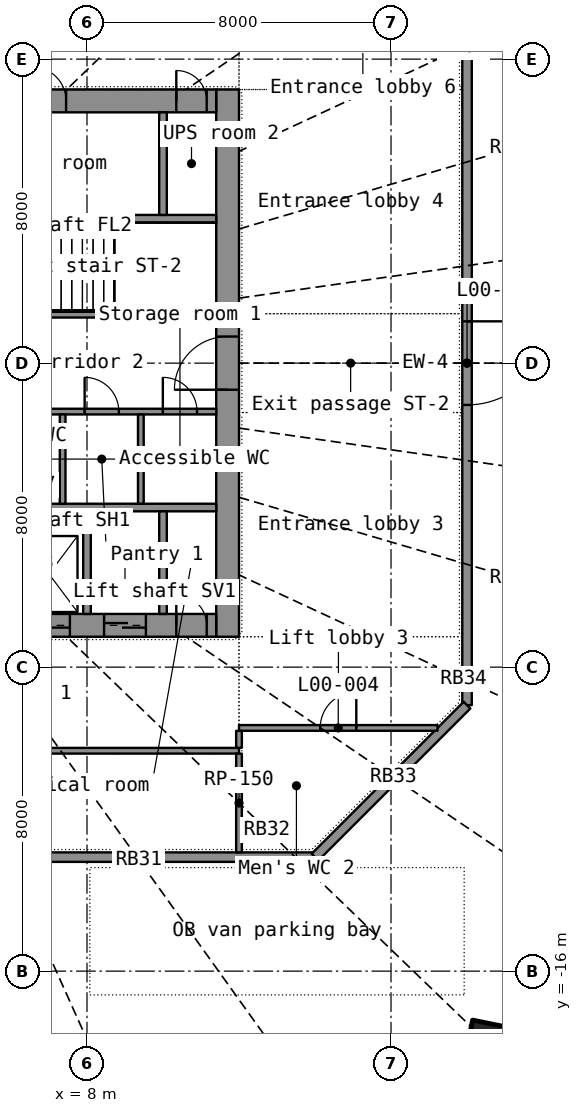
"""IFC4 building model, lengths in metres.
Left out: names, types, materials, properties, quantities, classifications, styles, units other than length and angle.
Written with IfcOpenShell. Run it as: python <this file> out.ifc"""

import sys

from ifc_helpers import new_model, si_unit, direction, frame, frame_2d, origin, origin_2d, place, context, subcontext, project, spatial, rectangle, hollow_rectangle, extrude, element, fill, save


model = new_model("IFC4")
c1 = context("Model", 3, precision=1e-05, world=origin(), true_north=direction((0.0, 1.0)))
c2 = subcontext(c1, "Body", "Model", "MODEL_VIEW")
j1 = project(units=[si_unit("LENGTHUNIT", "METRE"), si_unit("PLANEANGLEUNIT", "RADIAN")], contexts=[c1])
p1 = place(None, origin())
s1 = spatial("IfcSite", under=j1, at=p1, CompositionType="ELEMENT")
p2 = place(p1, origin())
s2 = spatial("IfcBuilding", under=s1, at=p2, CompositionType="ELEMENT")
p3 = place(p2, origin())
s3 = spatial("IfcBuildingStorey", under=s2, at=p3, CompositionType="ELEMENT", Elevation=0.0)
p4 = place(p3, frame((18.536, -17.878, 0.0), z_axis=(-0.022240937, 0.021683171, 0.999517474), x_axis=(-0.827084796, -0.562042845, -0.006211267)))
e1 = element("IfcColumn", 1, at=p4, inside=s3, PredefinedType="COLUMN", context=c2, shape_type="SweptSolid", body=[
    extrude(hollow_rectangle(XDim=1.0, YDim=1.0, WallThickness=0.032, at=origin_2d()), origin(), (0.0, 0.0, 1.0), 7.003),
])
p5 = place(p3, frame((18.0, 9.0, 0.0), z_axis=(0.0, 0.0, 1.0), x_axis=(0.0, -1.0, 0.0)))
e2 = element("IfcWall", 2, at=p5, inside=s3, PredefinedType="STANDARD", context=c2, shape_type="SweptSolid", body=[
    extrude(rectangle(XDim=18.0, YDim=0.25, at=frame_2d((9.0, 0.0))), origin(), (0.0, 0.0, 1.0), 6.6),
])
p6 = place(p5, frame((7.9, 0.0, 0.0)))
e3 = element("IfcOpeningElement", 3, at=p6, cuts=e2, PredefinedType="OPENING", context=c2, shape_type="SweptSolid", body=[
    extrude(rectangle(XDim=2.2, YDim=2.4, at=frame_2d((1.1, 1.2))), frame((0.0, 0.135, 0.0), z_axis=(0.0, -1.0, 0.0), x_axis=(1.0, 0.0, 0.0)), (0.0, 0.0, 1.0), 0.27),
])
p7 = place(p3, frame((14.0, -13.0, 0.0), z_axis=(0.0, 0.0, 1.0), x_axis=(-1.0, 0.0, 0.0)))
e4 = element("IfcWall", 4, at=p7, inside=s3, PredefinedType="STANDARD", context=c2, shape_type="SweptSolid", body=[
    extrude(rectangle(XDim=28.0, YDim=0.25, at=frame_2d((14.0, 0.0))), origin(), (0.0, 0.0, 1.0), 6.6),
])
p8 = place(p7, frame((15.8, 0.0, 0.0)))
e5 = element("IfcOpeningElement", 5, at=p8, cuts=e4, PredefinedType="OPENING", context=c2, shape_type="SweptSolid", body=[
    extrude(rectangle(XDim=2.4, YDim=3.0, at=frame_2d((1.2, 1.5))), frame((0.0, 0.135, 0.0), z_axis=(0.0, -1.0, 0.0), x_axis=(1.0, 0.0, 0.0)), (0.0, 0.0, 1.0), 0.27),
])
p9 = place(p7, frame((9.8, 0.0, 0.0)))
e6 = element("IfcOpeningElement", 6, at=p9, cuts=e4, PredefinedType="OPENING", context=c2, shape_type="SweptSolid", body=[
    extrude(rectangle(XDim=2.4, YDim=3.0, at=frame_2d((1.2, 1.5))), frame((0.0, 0.135, 0.0), z_axis=(0.0, -1.0, 0.0), x_axis=(1.0, 0.0, 0.0)), (0.0, 0.0, 1.0), 0.27),
])
p10 = place(p3, frame((18.0, -9.0, 0.0), z_axis=(0.0, 0.0, 1.0), x_axis=(-0.707106781, -0.707106781, 0.0)))
e7 = element("IfcWall", 7, at=p10, inside=s3, PredefinedType="STANDARD", context=c2, shape_type="SweptSolid", body=[
    extrude(rectangle(XDim=5.657, YDim=0.25, at=frame_2d((2.828, 0.0))), origin(), (0.0, 0.0, 1.0), 6.6),
])
p11 = place(p3, frame((11.7, -7.2, 0.0), z_axis=(0.0, 0.0, 1.0), x_axis=(0.0, 1.0, 0.0)))
e8 = element("IfcWall", 8, at=p11, inside=s3, PredefinedType="SHEAR", context=c2, shape_type="SweptSolid", body=[
    extrude(rectangle(XDim=14.4, YDim=0.6, at=frame_2d((7.2, 0.0))), origin(), (0.0, 0.0, 1.0), 6.6),
])
p12 = place(p11, frame((6.5, 0.0, 0.0)))
e9 = element("IfcOpeningElement", 9, at=p12, cuts=e8, PredefinedType="OPENING", context=c2, shape_type="SweptSolid", body=[
    extrude(rectangle(XDim=1.4, YDim=2.2, at=frame_2d((0.7, 1.1))), frame((0.0, 0.31, 0.0), z_axis=(0.0, -1.0, 0.0), x_axis=(1.0, 0.0, 0.0)), (0.0, 0.0, 1.0), 0.62),
])
p13 = place(p3, frame((-11.4, -6.9, 0.0), z_axis=(0.0, 0.0, 1.0), x_axis=(1.0, 0.0, 0.0)))
e10 = element("IfcWall", 10, at=p13, inside=s3, PredefinedType="SHEAR", context=c2, shape_type="SweptSolid", body=[
    extrude(rectangle(XDim=22.8, YDim=0.6, at=frame_2d((11.4, 0.0))), origin(), (0.0, 0.0, 1.0), 6.6),
])
p14 = place(p13, frame((1.85, 0.0, 0.0)))
e11 = element("IfcOpeningElement", 11, at=p14, cuts=e10, PredefinedType="OPENING", context=c2, shape_type="SweptSolid", body=[
    extrude(rectangle(XDim=1.1, YDim=2.2, at=frame_2d((0.55, 1.1))), frame((0.0, 0.31, 0.0), z_axis=(0.0, -1.0, 0.0), x_axis=(1.0, 0.0, 0.0)), (0.0, 0.0, 1.0), 0.62),
])
p15 = place(p13, frame((3.85, 0.0, 0.0)))
e12 = element("IfcOpeningElement", 12, at=p15, cuts=e10, PredefinedType="OPENING", context=c2, shape_type="SweptSolid", body=[
    extrude(rectangle(XDim=1.1, YDim=2.2, at=frame_2d((0.55, 1.1))), frame((0.0, 0.31, 0.0), z_axis=(0.0, -1.0, 0.0), x_axis=(1.0, 0.0, 0.0)), (0.0, 0.0, 1.0), 0.62),
])
p16 = place(p13, frame((5.85, 0.0, 0.0)))
e13 = element("IfcOpeningElement", 13, at=p16, cuts=e10, PredefinedType="OPENING", context=c2, shape_type="SweptSolid", body=[
    extrude(rectangle(XDim=1.1, YDim=2.2, at=frame_2d((0.55, 1.1))), frame((0.0, 0.31, 0.0), z_axis=(0.0, -1.0, 0.0), x_axis=(1.0, 0.0, 0.0)), (0.0, 0.0, 1.0), 0.62),
])
p17 = place(p13, frame((7.85, 0.0, 0.0)))
e14 = element("IfcOpeningElement", 14, at=p17, cuts=e10, PredefinedType="OPENING", context=c2, shape_type="SweptSolid", body=[
    extrude(rectangle(XDim=1.1, YDim=2.2, at=frame_2d((0.55, 1.1))), frame((0.0, 0.31, 0.0), z_axis=(0.0, -1.0, 0.0), x_axis=(1.0, 0.0, 0.0)), (0.0, 0.0, 1.0), 0.62),
])
p18 = place(p13, frame((9.85, 0.0, 0.0)))
e15 = element("IfcOpeningElement", 15, at=p18, cuts=e10, PredefinedType="OPENING", context=c2, shape_type="SweptSolid", body=[
    extrude(rectangle(XDim=1.1, YDim=2.2, at=frame_2d((0.55, 1.1))), frame((0.0, 0.31, 0.0), z_axis=(0.0, -1.0, 0.0), x_axis=(1.0, 0.0, 0.0)), (0.0, 0.0, 1.0), 0.62),
])
p19 = place(p13, frame((11.85, 0.0, 0.0)))
e16 = element("IfcOpeningElement", 16, at=p19, cuts=e10, PredefinedType="OPENING", context=c2, shape_type="SweptSolid", body=[
    extrude(rectangle(XDim=1.1, YDim=2.2, at=frame_2d((0.55, 1.1))), frame((0.0, 0.31, 0.0), z_axis=(0.0, -1.0, 0.0), x_axis=(1.0, 0.0, 0.0)), (0.0, 0.0, 1.0), 0.62),
])
p20 = place(p13, frame((13.85, 0.0, 0.0)))
e17 = element("IfcOpeningElement", 17, at=p20, cuts=e10, PredefinedType="OPENING", context=c2, shape_type="SweptSolid", body=[
    extrude(rectangle(XDim=1.1, YDim=2.2, at=frame_2d((0.55, 1.1))), frame((0.0, 0.31, 0.0), z_axis=(0.0, -1.0, 0.0), x_axis=(1.0, 0.0, 0.0)), (0.0, 0.0, 1.0), 0.62),
])
p21 = place(p13, frame((15.85, 0.0, 0.0)))
e18 = element("IfcOpeningElement", 18, at=p21, cuts=e10, PredefinedType="OPENING", context=c2, shape_type="SweptSolid", body=[
    extrude(rectangle(XDim=1.1, YDim=2.2, at=frame_2d((0.55, 1.1))), frame((0.0, 0.31, 0.0), z_axis=(0.0, -1.0, 0.0), x_axis=(1.0, 0.0, 0.0)), (0.0, 0.0, 1.0), 0.62),
])
p22 = place(p13, frame((17.85, 0.0, 0.0)))
e19 = element("IfcOpeningElement", 19, at=p22, cuts=e10, PredefinedType="OPENING", context=c2, shape_type="SweptSolid", body=[
    extrude(rectangle(XDim=1.1, YDim=2.2, at=frame_2d((0.55, 1.1))), frame((0.0, 0.31, 0.0), z_axis=(0.0, -1.0, 0.0), x_axis=(1.0, 0.0, 0.0)), (0.0, 0.0, 1.0), 0.62),
])
p23 = place(p13, frame((19.85, 0.0, 0.0)))
e20 = element("IfcOpeningElement", 20, at=p23, cuts=e10, PredefinedType="OPENING", context=c2, shape_type="SweptSolid", body=[
    extrude(rectangle(XDim=1.1, YDim=2.2, at=frame_2d((0.55, 1.1))), frame((0.0, 0.31, 0.0), z_axis=(0.0, -1.0, 0.0), x_axis=(1.0, 0.0, 0.0)), (0.0, 0.0, 1.0), 0.62),
])
p24 = place(p13, frame((0.25, 0.0, 0.0)))
e21 = element("IfcOpeningElement", 21, at=p24, cuts=e10, PredefinedType="OPENING", context=c2, shape_type="SweptSolid", body=[
    extrude(rectangle(XDim=0.8, YDim=2.05, at=frame_2d((0.4, 1.025))), frame((0.0, 0.31, 0.0), z_axis=(0.0, -1.0, 0.0), x_axis=(1.0, 0.0, 0.0)), (0.0, 0.0, 1.0), 0.62),
])
p25 = place(p13, frame((21.75, 0.0, 0.0)))
e22 = element("IfcOpeningElement", 22, at=p25, cuts=e10, PredefinedType="OPENING", context=c2, shape_type="SweptSolid", body=[
    extrude(rectangle(XDim=0.8, YDim=2.05, at=frame_2d((0.4, 1.025))), frame((0.0, 0.31, 0.0), z_axis=(0.0, -1.0, 0.0), x_axis=(1.0, 0.0, 0.0)), (0.0, 0.0, 1.0), 0.62),
])
p26 = place(p3, frame((-11.4, 6.9, 0.0), z_axis=(0.0, 0.0, 1.0), x_axis=(1.0, 0.0, 0.0)))
e23 = element("IfcWall", 23, at=p26, inside=s3, PredefinedType="SHEAR", context=c2, shape_type="SweptSolid", body=[
    extrude(rectangle(XDim=22.8, YDim=0.6, at=frame_2d((11.4, 0.0))), origin(), (0.0, 0.0, 1.0), 6.6),
])
p27 = place(p26, frame((1.85, 0.0, 0.0)))
e24 = element("IfcOpeningElement", 24, at=p27, cuts=e23, PredefinedType="OPENING", context=c2, shape_type="SweptSolid", body=[
    extrude(rectangle(XDim=1.1, YDim=2.2, at=frame_2d((0.55, 1.1))), frame((0.0, 0.31, 0.0), z_axis=(0.0, -1.0, 0.0), x_axis=(1.0, 0.0, 0.0)), (0.0, 0.0, 1.0), 0.62),
])
p28 = place(p26, frame((3.85, 0.0, 0.0)))
e25 = element("IfcOpeningElement", 25, at=p28, cuts=e23, PredefinedType="OPENING", context=c2, shape_type="SweptSolid", body=[
    extrude(rectangle(XDim=1.1, YDim=2.2, at=frame_2d((0.55, 1.1))), frame((0.0, 0.31, 0.0), z_axis=(0.0, -1.0, 0.0), x_axis=(1.0, 0.0, 0.0)), (0.0, 0.0, 1.0), 0.62),
])
p29 = place(p26, frame((6.95, 0.0, 0.0)))
e26 = element("IfcOpeningElement", 26, at=p29, cuts=e23, PredefinedType="OPENING", context=c2, shape_type="SweptSolid", body=[
    extrude(rectangle(XDim=0.9, YDim=2.1, at=frame_2d((0.45, 1.05))), frame((0.0, 0.31, 0.0), z_axis=(0.0, -1.0, 0.0), x_axis=(1.0, 0.0, 0.0)), (0.0, 0.0, 1.0), 0.62),
])
p30 = place(p26, frame((11.95, 0.0, 0.0)))
e27 = element("IfcOpeningElement", 27, at=p30, cuts=e23, PredefinedType="OPENING", context=c2, shape_type="SweptSolid", body=[
    extrude(rectangle(XDim=0.9, YDim=2.1, at=frame_2d((0.45, 1.05))), frame((0.0, 0.31, 0.0), z_axis=(0.0, -1.0, 0.0), x_axis=(1.0, 0.0, 0.0)), (0.0, 0.0, 1.0), 0.62),
])
p31 = place(p26, frame((17.95, 0.0, 0.0)))
e28 = element("IfcOpeningElement", 28, at=p31, cuts=e23, PredefinedType="OPENING", context=c2, shape_type="SweptSolid", body=[
    extrude(rectangle(XDim=0.9, YDim=2.1, at=frame_2d((0.45, 1.05))), frame((0.0, 0.31, 0.0), z_axis=(0.0, -1.0, 0.0), x_axis=(1.0, 0.0, 0.0)), (0.0, 0.0, 1.0), 0.62),
])
p32 = place(p26, frame((0.25, 0.0, 0.0)))
e29 = element("IfcOpeningElement", 29, at=p32, cuts=e23, PredefinedType="OPENING", context=c2, shape_type="SweptSolid", body=[
    extrude(rectangle(XDim=0.8, YDim=2.05, at=frame_2d((0.4, 1.025))), frame((0.0, 0.31, 0.0), z_axis=(0.0, -1.0, 0.0), x_axis=(1.0, 0.0, 0.0)), (0.0, 0.0, 1.0), 0.62),
])
p33 = place(p26, frame((21.75, 0.0, 0.0)))
e30 = element("IfcOpeningElement", 30, at=p33, cuts=e23, PredefinedType="OPENING", context=c2, shape_type="SweptSolid", body=[
    extrude(rectangle(XDim=0.8, YDim=2.05, at=frame_2d((0.4, 1.025))), frame((0.0, 0.31, 0.0), z_axis=(0.0, -1.0, 0.0), x_axis=(1.0, 0.0, 0.0)), (0.0, 0.0, 1.0), 0.62),
])
for number, where, z_axis, x_axis in (
    (31, (-11.4, -3.8, 0.0), (0.0, 0.0, 1.0), (1.0, 0.0, 0.0)),
    (32, (-11.4, 3.8, 0.0), (0.0, 0.0, 1.0), (1.0, 0.0, 0.0)),
):
    element("IfcWall", number, at=place(p3, frame(where, z_axis=z_axis, x_axis=x_axis)), inside=s3, PredefinedType="SHEAR", context=c2, shape_type="SweptSolid", body=[
        extrude(rectangle(XDim=22.8, YDim=0.2, at=frame_2d((11.4, 0.0))), origin(), (0.0, 0.0, 1.0), 6.6),
    ])
for number, where, z_axis, x_axis in (
    (33, (8.0, -6.6, 0.0), (0.0, 0.0, 1.0), (0.0, 1.0, 0.0)),
    (34, (10.0, -6.6, 0.0), (0.0, 0.0, 1.0), (0.0, 1.0, 0.0)),
    (35, (10.0, 3.9, 0.0), (0.0, 0.0, 1.0), (0.0, 1.0, 0.0)),
):
    element("IfcWall", number, at=place(p3, frame(where, z_axis=z_axis, x_axis=x_axis)), inside=s3, PredefinedType="SHEAR", context=c2, shape_type="SweptSolid", body=[
        extrude(rectangle(XDim=2.7, YDim=0.2, at=frame_2d((1.35, 0.0))), origin(), (0.0, 0.0, 1.0), 6.6),
    ])
p34 = place(p3, frame((3.0, -1.275, 0.0), z_axis=(0.0, 0.0, 1.0), x_axis=(1.0, 0.0, 0.0)))
e36 = element("IfcWall", 36, at=p34, inside=s3, PredefinedType="PARTITIONING", context=c2, shape_type="SweptSolid", body=[
    extrude(rectangle(XDim=8.4, YDim=0.15, at=frame_2d((4.2, 0.0))), origin(), (0.0, 0.0, 1.0), 6.6),
])
p35 = place(p34, frame((0.608, 0.0, 0.0)))
e37 = element("IfcOpeningElement", 37, at=p35, cuts=e36, PredefinedType="OPENING", context=c2, shape_type="SweptSolid", body=[
    extrude(rectangle(XDim=0.85, YDim=2.1, at=frame_2d((0.425, 1.05))), frame((0.0, 0.085, 0.0), z_axis=(0.0, -1.0, 0.0), x_axis=(1.0, 0.0, 0.0)), (0.0, 0.0, 1.0), 0.17),
])
p36 = place(p34, frame((2.825, 0.0, 0.0)))
e38 = element("IfcOpeningElement", 38, at=p36, cuts=e36, PredefinedType="OPENING", context=c2, shape_type="SweptSolid", body=[
    extrude(rectangle(XDim=0.85, YDim=2.1, at=frame_2d((0.425, 1.05))), frame((0.0, 0.085, 0.0), z_axis=(0.0, -1.0, 0.0), x_axis=(1.0, 0.0, 0.0)), (0.0, 0.0, 1.0), 0.17),
])
p37 = place(p34, frame((4.938, 0.0, 0.0)))
e39 = element("IfcOpeningElement", 39, at=p37, cuts=e36, PredefinedType="OPENING", context=c2, shape_type="SweptSolid", body=[
    extrude(rectangle(XDim=0.9, YDim=2.1, at=frame_2d((0.45, 1.05))), frame((0.0, 0.085, 0.0), z_axis=(0.0, -1.0, 0.0), x_axis=(1.0, 0.0, 0.0)), (0.0, 0.0, 1.0), 0.17),
])
p38 = place(p34, frame((6.996, 0.0, 0.0)))
e40 = element("IfcOpeningElement", 40, at=p38, cuts=e36, PredefinedType="OPENING", context=c2, shape_type="SweptSolid", body=[
    extrude(rectangle(XDim=0.9, YDim=2.1, at=frame_2d((0.45, 1.05))), frame((0.0, 0.085, 0.0), z_axis=(0.0, -1.0, 0.0), x_axis=(1.0, 0.0, 0.0)), (0.0, 0.0, 1.0), 0.17),
])
p39 = place(p3, frame((3.0, 1.275, 0.0), z_axis=(0.0, 0.0, 1.0), x_axis=(1.0, 0.0, 0.0)))
e41 = element("IfcWall", 41, at=p39, inside=s3, PredefinedType="SHEAR", context=c2, shape_type="SweptSolid", body=[
    extrude(rectangle(XDim=8.4, YDim=0.15, at=frame_2d((4.2, 0.0))), origin(), (0.0, 0.0, 1.0), 6.6),
])
p40 = place(p39, frame((2.05, 0.0, 0.0)))
e42 = element("IfcOpeningElement", 42, at=p40, cuts=e41, PredefinedType="OPENING", context=c2, shape_type="SweptSolid", body=[
    extrude(rectangle(XDim=1.1, YDim=2.15, at=frame_2d((0.55, 1.075))), frame((0.0, 0.085, 0.0), z_axis=(0.0, -1.0, 0.0), x_axis=(1.0, 0.0, 0.0)), (0.0, 0.0, 1.0), 0.17),
])
p41 = place(p39, frame((0.45, 0.0, 0.0)))
e43 = element("IfcOpeningElement", 43, at=p41, cuts=e41, PredefinedType="OPENING", context=c2, shape_type="SweptSolid", body=[
    extrude(rectangle(XDim=0.9, YDim=2.1, at=frame_2d((0.45, 1.05))), frame((0.0, 0.085, 0.0), z_axis=(0.0, -1.0, 0.0), x_axis=(1.0, 0.0, 0.0)), (0.0, 0.0, 1.0), 0.17),
])
for number, where, z_axis, x_axis in (
    (44, (7.359, -3.7, 0.0), (0.0, 0.0, 1.0), (0.0, 1.0, 0.0)),
    (45, (9.417, -3.7, 0.0), (0.0, 0.0, 1.0), (0.0, 1.0, 0.0)),
):
    element("IfcWall", number, at=place(p3, frame(where, z_axis=z_axis, x_axis=x_axis)), inside=s3, PredefinedType="PARTITIONING", context=c2, shape_type="SweptSolid", body=[
        extrude(rectangle(XDim=2.35, YDim=0.15, at=frame_2d((1.175, 0.0))), origin(), (0.0, 0.0, 1.0), 6.6),
    ])
p42 = place(p3, frame((-12.0, -10.2, 0.0), z_axis=(0.0, 0.0, 1.0), x_axis=(1.0, 0.0, 0.0)))
e46 = element("IfcWall", 46, at=p42, inside=s3, PredefinedType="PARTITIONING", context=c2, shape_type="SweptSolid", body=[
    extrude(rectangle(XDim=24.0, YDim=0.15, at=frame_2d((12.0, 0.0))), origin(), (0.0, 0.0, 1.0), 5.6),
])
p43 = place(p42, frame((11.1, 0.0, 0.0)))
e47 = element("IfcOpeningElement", 47, at=p43, cuts=e46, PredefinedType="OPENING", context=c2, shape_type="SweptSolid", body=[
    extrude(rectangle(XDim=1.8, YDim=2.4, at=frame_2d((0.9, 1.2))), frame((0.0, 0.085, 0.0), z_axis=(0.0, -1.0, 0.0), x_axis=(1.0, 0.0, 0.0)), (0.0, 0.0, 1.0), 0.17),
])
p44 = place(p3, frame((12.0, -9.6, 0.0), z_axis=(0.0, 0.0, 1.0), x_axis=(1.0, 0.0, 0.0)))
e48 = element("IfcWall", 48, at=p44, inside=s3, PredefinedType="PARTITIONING", context=c2, shape_type="SweptSolid", body=[
    extrude(rectangle(XDim=5.223, YDim=0.15, at=frame_2d((2.612, 0.0))), origin(), (0.0, 0.0, 1.0), 5.6),
])
p45 = place(p44, frame((2.137, 0.0, 0.0)))
e49 = element("IfcOpeningElement", 49, at=p45, cuts=e48, PredefinedType="OPENING", context=c2, shape_type="SweptSolid", body=[
    extrude(rectangle(XDim=0.95, YDim=2.15, at=frame_2d((0.475, 1.075))), frame((0.0, 0.085, 0.0), z_axis=(0.0, -1.0, 0.0), x_axis=(1.0, 0.0, 0.0)), (0.0, 0.0, 1.0), 0.17),
])
p46 = place(p3, frame((12.0, -10.277, 0.0), z_axis=(0.0, 0.0, 1.0), x_axis=(0.0, -1.0, 0.0)))
e50 = element("IfcWall", 50, at=p46, inside=s3, PredefinedType="PARTITIONING", context=c2, shape_type="SweptSolid", body=[
    extrude(rectangle(XDim=2.598, YDim=0.15, at=frame_2d((1.299, 0.0))), origin(), (0.0, 0.0, 1.0), 5.6),
])
p47 = place(p3, frame((12.0, -10.123, 0.0), z_axis=(0.0, 0.0, 1.0), x_axis=(0.0, 1.0, 0.0)))
e51 = element("IfcWall", 51, at=p47, inside=s3, PredefinedType="PARTITIONING", context=c2, shape_type="SweptSolid", body=[
    extrude(rectangle(XDim=0.446, YDim=0.15, at=frame_2d((0.223, 0.0))), origin(), (0.0, 0.0, 1.0), 5.6),
])
p48 = place(p6, origin())
e52 = element("IfcDoor", 52, at=p48, inside=s3, OperationType="DOUBLE_DOOR_SINGLE_SWING", PredefinedType="DOOR", context=c2, shape_type="SweptSolid", body=[
    extrude(rectangle(XDim=2.2, YDim=2.4, at=frame_2d((1.1, 1.2))), frame((0.0, 0.025, 0.0), z_axis=(0.0, -1.0, 0.0), x_axis=(1.0, 0.0, 0.0)), (0.0, 0.0, 1.0), 0.05),
])
fill(e3, e52)
p49 = place(p22, origin())
e53 = element("IfcDoor", 53, at=p49, inside=s3, OperationType="DOUBLE_DOOR_SLIDING", PredefinedType="DOOR", context=c2, shape_type="SweptSolid", body=[
    extrude(rectangle(XDim=1.1, YDim=2.2, at=frame_2d((0.55, 1.1))), frame((0.0, 0.025, 0.0), z_axis=(0.0, -1.0, 0.0), x_axis=(1.0, 0.0, 0.0)), (0.0, 0.0, 1.0), 0.05),
])
fill(e19, e53)
p50 = place(p23, origin())
e54 = element("IfcDoor", 54, at=p50, inside=s3, OperationType="DOUBLE_DOOR_SLIDING", PredefinedType="DOOR", context=c2, shape_type="SweptSolid", body=[
    extrude(rectangle(XDim=1.1, YDim=2.2, at=frame_2d((0.55, 1.1))), frame((0.0, 0.025, 0.0), z_axis=(0.0, -1.0, 0.0), x_axis=(1.0, 0.0, 0.0)), (0.0, 0.0, 1.0), 0.05),
])
fill(e20, e54)
p51 = place(p25, origin())
e55 = element("IfcDoor", 55, at=p51, inside=s3, OperationType="SINGLE_SWING_LEFT", PredefinedType="DOOR", context=c2, shape_type="SweptSolid", body=[
    extrude(rectangle(XDim=0.8, YDim=2.05, at=frame_2d((0.4, 1.025))), frame((0.0, 0.025, 0.0), z_axis=(0.0, -1.0, 0.0), x_axis=(1.0, 0.0, 0.0)), (0.0, 0.0, 1.0), 0.05),
])
fill(e22, e55)
p52 = place(p31, origin())
e56 = element("IfcDoor", 56, at=p52, inside=s3, OperationType="SINGLE_SWING_LEFT", PredefinedType="DOOR", context=c2, shape_type="SweptSolid", body=[
    extrude(rectangle(XDim=0.9, YDim=2.1, at=frame_2d((0.45, 1.05))), frame((0.0, 0.025, 0.0), z_axis=(0.0, -1.0, 0.0), x_axis=(1.0, 0.0, 0.0)), (0.0, 0.0, 1.0), 0.05),
])
fill(e28, e56)
p53 = place(p33, origin())
e57 = element("IfcDoor", 57, at=p53, inside=s3, OperationType="SINGLE_SWING_LEFT", PredefinedType="DOOR", context=c2, shape_type="SweptSolid", body=[
    extrude(rectangle(XDim=0.8, YDim=2.05, at=frame_2d((0.4, 1.025))), frame((0.0, 0.025, 0.0), z_axis=(0.0, -1.0, 0.0), x_axis=(1.0, 0.0, 0.0)), (0.0, 0.0, 1.0), 0.05),
])
fill(e30, e57)
p54 = place(p12, origin())
e58 = element("IfcDoor", 58, at=p54, inside=s3, OperationType="DOUBLE_DOOR_SINGLE_SWING", PredefinedType="DOOR", context=c2, shape_type="SweptSolid", body=[
    extrude(rectangle(XDim=1.4, YDim=2.2, at=frame_2d((0.7, 1.1))), frame((0.0, 0.025, 0.0), z_axis=(0.0, -1.0, 0.0), x_axis=(1.0, 0.0, 0.0)), (0.0, 0.0, 1.0), 0.05),
])
fill(e9, e58)
p55 = place(p37, origin())
e59 = element("IfcDoor", 59, at=p55, inside=s3, OperationType="SINGLE_SWING_LEFT", PredefinedType="DOOR", context=c2, shape_type="SweptSolid", body=[
    extrude(rectangle(XDim=0.9, YDim=2.1, at=frame_2d((0.45, 1.05))), frame((0.0, 0.025, 0.0), z_axis=(0.0, -1.0, 0.0), x_axis=(1.0, 0.0, 0.0)), (0.0, 0.0, 1.0), 0.05),
])
fill(e39, e59)
p56 = place(p38, origin())
e60 = element("IfcDoor", 60, at=p56, inside=s3, OperationType="SINGLE_SWING_LEFT", PredefinedType="DOOR", context=c2, shape_type="SweptSolid", body=[
    extrude(rectangle(XDim=0.9, YDim=2.1, at=frame_2d((0.45, 1.05))), frame((0.0, 0.025, 0.0), z_axis=(0.0, -1.0, 0.0), x_axis=(1.0, 0.0, 0.0)), (0.0, 0.0, 1.0), 0.05),
])
fill(e40, e60)
p57 = place(p45, origin())
e61 = element("IfcDoor", 61, at=p57, inside=s3, OperationType="SINGLE_SWING_RIGHT", PredefinedType="DOOR", context=c2, shape_type="SweptSolid", body=[
    extrude(rectangle(XDim=0.95, YDim=2.15, at=frame_2d((0.475, 1.075))), frame((0.0, 0.025, 0.0), z_axis=(0.0, -1.0, 0.0), x_axis=(1.0, 0.0, 0.0)), (0.0, 0.0, 1.0), 0.05),
])
fill(e49, e61)
save(model, sys.argv[1])
